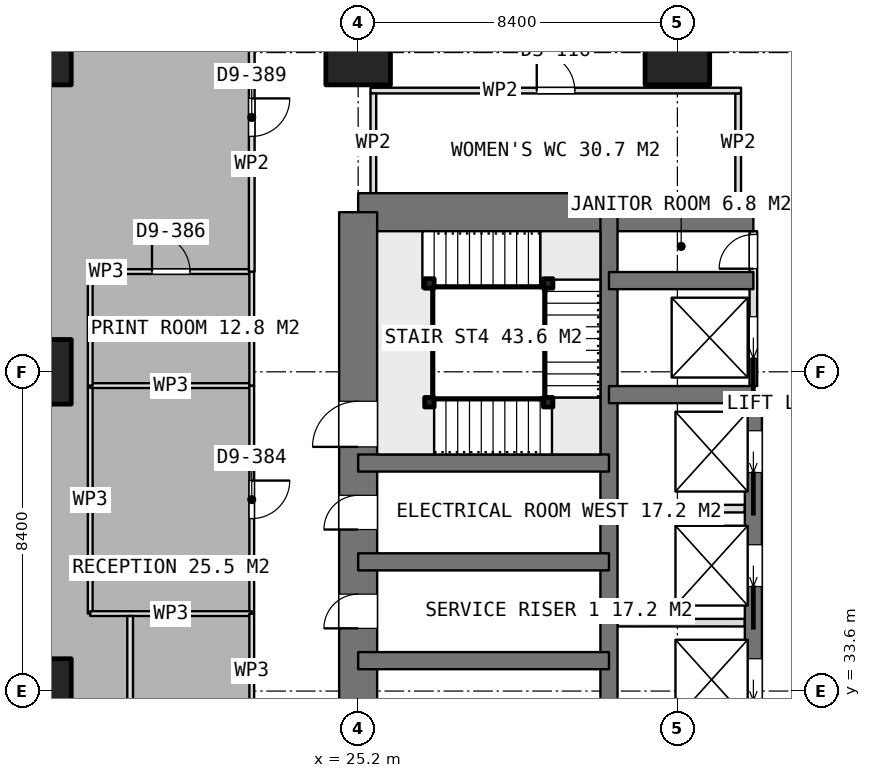
"""IFC4 building model, lengths in metres.
Left out: names, types, materials, properties, quantities, classifications, styles, units other than length and angle.
Written with IfcOpenShell. Run it as: python <this file> out.ifc"""

import sys

from ifc_helpers import new_model, si_unit, direction, frame, frame_2d, origin, origin_2d, place, context, subcontext, project, spatial, rectangle, extrude, element, fill, save


model = new_model("IFC4")
c1 = context("Model", 3, precision=1e-05, world=origin(), true_north=direction((0.0, 1.0)))
c2 = subcontext(c1, "Body", "Model", "MODEL_VIEW")
j1 = project(units=[si_unit("LENGTHUNIT", "METRE"), si_unit("PLANEANGLEUNIT", "RADIAN")], contexts=[c1])
p1 = place(None, origin())
s1 = spatial("IfcSite", under=j1, at=p1, CompositionType="ELEMENT")
p2 = place(p1, origin())
s2 = spatial("IfcBuilding", under=s1, at=p2, CompositionType="ELEMENT")
p3 = place(p2, frame((0.0, 0.0, 110.3)))
s3 = spatial("IfcBuildingStorey", under=s2, at=p3, CompositionType="ELEMENT", Elevation=110.3)
p4 = place(p3, frame((25.2, 46.2, 0.0), z_axis=(0.0, 0.0, 1.0), x_axis=(1.0, 0.0, 0.0)))
e1 = element("IfcWall", 1, at=p4, inside=s3, PredefinedType="SHEAR", context=c2, shape_type="SweptSolid", body=[
    extrude(rectangle(XDim=10.4, YDim=1.0, at=frame_2d((5.2, 0.0))), origin(), (0.0, 0.0, 1.0), 3.75),
])
p5 = place(p3, frame((25.2, 21.0, 0.0), z_axis=(0.0, 0.0, 1.0), x_axis=(0.0, 1.0, 0.0)))
e2 = element("IfcWall", 2, at=p5, inside=s3, PredefinedType="SHEAR", context=c2, shape_type="SweptSolid", body=[
    extrude(rectangle(XDim=25.2, YDim=1.0, at=frame_2d((12.6, 0.0))), origin(), (0.0, 0.0, 1.0), 3.75),
])
p6 = place(p5, frame((7.8, 0.0, 0.0)))
e3 = element("IfcOpeningElement", 3, at=p6, cuts=e2, PredefinedType="OPENING", context=c2, shape_type="SweptSolid", body=[
    extrude(rectangle(XDim=1.2, YDim=2.1, at=frame_2d((0.6, 1.05))), frame((0.0, 0.51, 0.0), z_axis=(0.0, -1.0, 0.0), x_axis=(1.0, 0.0, 0.0)), (0.0, 0.0, 1.0), 1.02),
])
p7 = place(p5, frame((14.25, 0.0, 0.0)))
e4 = element("IfcOpeningElement", 4, at=p7, cuts=e2, PredefinedType="OPENING", context=c2, shape_type="SweptSolid", body=[
    extrude(rectangle(XDim=0.9, YDim=2.1, at=frame_2d((0.45, 1.05))), frame((0.0, 0.51, 0.0), z_axis=(0.0, -1.0, 0.0), x_axis=(1.0, 0.0, 0.0)), (0.0, 0.0, 1.0), 1.02),
])
p8 = place(p5, frame((16.85, 0.0, 0.0)))
e5 = element("IfcOpeningElement", 5, at=p8, cuts=e2, PredefinedType="OPENING", context=c2, shape_type="SweptSolid", body=[
    extrude(rectangle(XDim=0.9, YDim=2.1, at=frame_2d((0.45, 1.05))), frame((0.0, 0.51, 0.0), z_axis=(0.0, -1.0, 0.0), x_axis=(1.0, 0.0, 0.0)), (0.0, 0.0, 1.0), 1.02),
])
p9 = place(p5, frame((19.025, 0.0, 0.0)))
e6 = element("IfcOpeningElement", 6, at=p9, cuts=e2, PredefinedType="OPENING", context=c2, shape_type="SweptSolid", body=[
    extrude(rectangle(XDim=1.2, YDim=2.1, at=frame_2d((0.6, 1.05))), frame((0.0, 0.51, 0.0), z_axis=(0.0, -1.0, 0.0), x_axis=(1.0, 0.0, 0.0)), (0.0, 0.0, 1.0), 1.02),
])
p10 = place(p3, frame((31.8, 21.0, 0.0), z_axis=(0.0, 0.0, 1.0), x_axis=(0.0, 1.0, 0.0)))
e7 = element("IfcWall", 7, at=p10, inside=s3, PredefinedType="SHEAR", context=c2, shape_type="SweptSolid", body=[
    extrude(rectangle(XDim=25.2, YDim=0.45, at=frame_2d((12.6, 0.0))), origin(), (0.0, 0.0, 1.0), 3.75),
])
p11 = place(p3, frame((35.6, 23.4, 0.0), z_axis=(0.0, 0.0, 1.0), x_axis=(0.0, 1.0, 0.0)))
e8 = element("IfcWall", 8, at=p11, inside=s3, PredefinedType="SHEAR", context=c2, shape_type="SweptSolid", body=[
    extrude(rectangle(XDim=18.0, YDim=0.45, at=frame_2d((9.0, 0.0))), origin(), (0.0, 0.0, 1.0), 3.75),
])
p12 = place(p11, frame((0.95, 0.0, 0.0)))
e9 = element("IfcOpeningElement", 9, at=p12, cuts=e8, PredefinedType="OPENING", context=c2, shape_type="SweptSolid", body=[
    extrude(rectangle(XDim=1.1, YDim=2.1, at=frame_2d((0.55, 1.05))), frame((0.0, 0.235, 0.0), z_axis=(0.0, -1.0, 0.0), x_axis=(1.0, 0.0, 0.0)), (0.0, 0.0, 1.0), 0.47),
])
p13 = place(p11, frame((3.95, 0.0, 0.0)))
e10 = element("IfcOpeningElement", 10, at=p13, cuts=e8, PredefinedType="OPENING", context=c2, shape_type="SweptSolid", body=[
    extrude(rectangle(XDim=1.1, YDim=2.1, at=frame_2d((0.55, 1.05))), frame((0.0, 0.235, 0.0), z_axis=(0.0, -1.0, 0.0), x_axis=(1.0, 0.0, 0.0)), (0.0, 0.0, 1.0), 0.47),
])
p14 = place(p11, frame((6.95, 0.0, 0.0)))
e11 = element("IfcOpeningElement", 11, at=p14, cuts=e8, PredefinedType="OPENING", context=c2, shape_type="SweptSolid", body=[
    extrude(rectangle(XDim=1.1, YDim=2.1, at=frame_2d((0.55, 1.05))), frame((0.0, 0.235, 0.0), z_axis=(0.0, -1.0, 0.0), x_axis=(1.0, 0.0, 0.0)), (0.0, 0.0, 1.0), 0.47),
])
p15 = place(p11, frame((9.95, 0.0, 0.0)))
e12 = element("IfcOpeningElement", 12, at=p15, cuts=e8, PredefinedType="OPENING", context=c2, shape_type="SweptSolid", body=[
    extrude(rectangle(XDim=1.1, YDim=2.1, at=frame_2d((0.55, 1.05))), frame((0.0, 0.235, 0.0), z_axis=(0.0, -1.0, 0.0), x_axis=(1.0, 0.0, 0.0)), (0.0, 0.0, 1.0), 0.47),
])
p16 = place(p11, frame((12.95, 0.0, 0.0)))
e13 = element("IfcOpeningElement", 13, at=p16, cuts=e8, PredefinedType="OPENING", context=c2, shape_type="SweptSolid", body=[
    extrude(rectangle(XDim=1.1, YDim=2.1, at=frame_2d((0.55, 1.05))), frame((0.0, 0.235, 0.0), z_axis=(0.0, -1.0, 0.0), x_axis=(1.0, 0.0, 0.0)), (0.0, 0.0, 1.0), 0.47),
])
p17 = place(p11, frame((15.95, 0.0, 0.0)))
e14 = element("IfcOpeningElement", 14, at=p17, cuts=e8, PredefinedType="OPENING", context=c2, shape_type="SweptSolid", body=[
    extrude(rectangle(XDim=1.1, YDim=2.1, at=frame_2d((0.55, 1.05))), frame((0.0, 0.235, 0.0), z_axis=(0.0, -1.0, 0.0), x_axis=(1.0, 0.0, 0.0)), (0.0, 0.0, 1.0), 0.47),
])
for number, where, z_axis, x_axis in (
    (15, (31.8, 41.4, 0.0), (0.0, 0.0, 1.0), (1.0, 0.0, 0.0)),
    (16, (31.8, 44.4, 0.0), (0.0, 0.0, 1.0), (1.0, 0.0, 0.0)),
):
    element("IfcWall", number, at=place(p3, frame(where, z_axis=z_axis, x_axis=x_axis)), inside=s3, PredefinedType="SHEAR", context=c2, shape_type="SweptSolid", body=[
        extrude(rectangle(XDim=3.8, YDim=0.45, at=frame_2d((1.9, 0.0))), origin(), (0.0, 0.0, 1.0), 3.75),
    ])
for number, where, z_axis, x_axis in (
    (17, (25.2, 34.4, 0.0), (0.0, 0.0, 1.0), (1.0, 0.0, 0.0)),
    (18, (25.2, 37.0, 0.0), (0.0, 0.0, 1.0), (1.0, 0.0, 0.0)),
    (19, (25.2, 39.6, 0.0), (0.0, 0.0, 1.0), (1.0, 0.0, 0.0)),
):
    element("IfcWall", number, at=place(p3, frame(where, z_axis=z_axis, x_axis=x_axis)), inside=s3, PredefinedType="SHEAR", context=c2, shape_type="SweptSolid", body=[
        extrude(rectangle(XDim=6.6, YDim=0.45, at=frame_2d((3.3, 0.0))), origin(), (0.0, 0.0, 1.0), 3.75),
    ])
for number, where, z_axis, x_axis in (
    (20, (16.8, 33.6, 0.0), (0.0, 0.0, 1.0), (1.0, 0.0, 0.0)),
    (21, (16.8, 42.0, 0.0), (0.0, 0.0, 1.0), (1.0, 0.0, 0.0)),
    (22, (16.8, 50.4, 0.0), (0.0, 0.0, 1.0), (1.0, 0.0, 0.0)),
    (23, (25.2, 50.4, 0.0), (0.0, 0.0, 1.0), (1.0, 0.0, 0.0)),
    (24, (33.6, 50.4, 0.0), (0.0, 0.0, 1.0), (1.0, 0.0, 0.0)),
):
    element("IfcColumn", number, at=place(p3, frame(where, z_axis=z_axis, x_axis=x_axis)), inside=s3, PredefinedType="COLUMN", context=c2, shape_type="SweptSolid", body=[
        extrude(rectangle(XDim=1.7, YDim=1.7, at=origin_2d()), origin(), (0.0, 0.0, 1.0), 3.75),
    ])
for number, where, z_axis, x_axis in (
    (25, (32.025, 35.4, 0.0), (0.0, 0.0, 1.0), (1.0, 0.0, 0.0)),
    (26, (32.025, 38.4, 0.0), (0.0, 0.0, 1.0), (1.0, 0.0, 0.0)),
):
    element("IfcWall", number, at=place(p3, frame(where, z_axis=z_axis, x_axis=x_axis)), inside=s3, PredefinedType="PARTITIONING", context=c2, shape_type="SweptSolid", body=[
        extrude(rectangle(XDim=3.35, YDim=0.2, at=frame_2d((1.675, 0.0))), origin(), (0.0, 0.0, 1.0), 3.5),
    ])
p18 = place(p3, frame((35.6, 41.625, 0.0), z_axis=(0.0, 0.0, 1.0), x_axis=(0.0, 1.0, 0.0)))
e27 = element("IfcWall", 27, at=p18, inside=s3, PredefinedType="PARTITIONING", context=c2, shape_type="SweptSolid", body=[
    extrude(rectangle(XDim=4.075, YDim=0.2, at=frame_2d((2.038, 0.0))), origin(), (0.0, 0.0, 1.0), 3.5),
])
p19 = place(p18, frame((3.088, 0.0, 0.0)))
e28 = element("IfcOpeningElement", 28, at=p19, cuts=e27, PredefinedType="OPENING", context=c2, shape_type="SweptSolid", body=[
    extrude(rectangle(XDim=0.9, YDim=2.1, at=frame_2d((0.45, 1.05))), frame((0.0, 0.11, 0.0), z_axis=(0.0, -1.0, 0.0), x_axis=(1.0, 0.0, 0.0)), (0.0, 0.0, 1.0), 0.22),
])
p20 = place(p18, frame((0.725, 0.0, 0.0)))
e29 = element("IfcOpeningElement", 29, at=p20, cuts=e27, PredefinedType="OPENING", context=c2, shape_type="SweptSolid", body=[
    extrude(rectangle(XDim=1.1, YDim=2.1, at=frame_2d((0.55, 1.05))), frame((0.0, 0.11, 0.0), z_axis=(0.0, -1.0, 0.0), x_axis=(1.0, 0.0, 0.0)), (0.0, 0.0, 1.0), 0.22),
])
p21 = place(p3, frame((25.525, 49.4, 0.0), z_axis=(0.0, 0.0, 1.0), x_axis=(1.0, 0.0, 0.0)))
e30 = element("IfcWall", 30, at=p21, inside=s3, PredefinedType="PARTITIONING", context=c2, shape_type="SweptSolid", body=[
    extrude(rectangle(XDim=9.75, YDim=0.15, at=frame_2d((4.875, 0.0))), origin(), (0.0, 0.0, 1.0), 3.5),
])
p22 = place(p21, frame((4.375, 0.0, 0.0)))
e31 = element("IfcOpeningElement", 31, at=p22, cuts=e30, PredefinedType="OPENING", context=c2, shape_type="SweptSolid", body=[
    extrude(rectangle(XDim=1.0, YDim=2.1, at=frame_2d((0.5, 1.05))), frame((0.0, 0.085, 0.0), z_axis=(0.0, -1.0, 0.0), x_axis=(1.0, 0.0, 0.0)), (0.0, 0.0, 1.0), 0.17),
])
for number, where, z_axis, x_axis in (
    (32, (25.6, 46.7, 0.0), (0.0, 0.0, 1.0), (0.0, 1.0, 0.0)),
    (33, (35.2, 46.7, 0.0), (0.0, 0.0, 1.0), (0.0, 1.0, 0.0)),
):
    element("IfcWall", number, at=place(p3, frame(where, z_axis=z_axis, x_axis=x_axis)), inside=s3, PredefinedType="PARTITIONING", context=c2, shape_type="SweptSolid", body=[
        extrude(rectangle(XDim=2.625, YDim=0.15, at=frame_2d((1.312, 0.0))), origin(), (0.0, 0.0, 1.0), 3.5),
    ])
p23 = place(p3, frame((18.15, 35.638, 0.0), z_axis=(0.0, 0.0, 1.0), x_axis=(0.0, 1.0, 0.0)))
e34 = element("IfcWall", 34, at=p23, inside=s3, PredefinedType="PARTITIONING", context=c2, shape_type="SweptSolid", body=[
    extrude(rectangle(XDim=5.999, YDim=0.125, at=frame_2d((3.0, 0.0))), origin(), (0.0, 0.0, 1.0), 3.5),
])
p24 = place(p3, frame((18.15, 41.637, 0.0), z_axis=(0.0, 0.0, 1.0), x_axis=(1.0, 0.0, 0.0)))
e35 = element("IfcWall", 35, at=p24, inside=s3, PredefinedType="PARTITIONING", context=c2, shape_type="SweptSolid", body=[
    extrude(rectangle(XDim=4.25, YDim=0.125, at=frame_2d((2.125, 0.0))), origin(), (0.0, 0.0, 1.0), 3.5),
])
p25 = place(p3, frame((22.4, 41.637, 0.0), z_axis=(0.0, 0.0, 1.0), x_axis=(0.0, -1.0, 0.0)))
e36 = element("IfcWall", 36, at=p25, inside=s3, PredefinedType="PARTITIONING", context=c2, shape_type="SweptSolid", body=[
    extrude(rectangle(XDim=5.999, YDim=0.125, at=frame_2d((3.0, 0.0))), origin(), (0.0, 0.0, 1.0), 3.5),
])
p26 = place(p25, frame((2.499, 0.0, 0.0)))
e37 = element("IfcOpeningElement", 37, at=p26, cuts=e36, PredefinedType="OPENING", context=c2, shape_type="SweptSolid", body=[
    extrude(rectangle(XDim=1.0, YDim=2.1, at=frame_2d((0.5, 1.05))), frame((0.0, 0.073, 0.0), z_axis=(0.0, -1.0, 0.0), x_axis=(1.0, 0.0, 0.0)), (0.0, 0.0, 1.0), 0.145),
])
p27 = place(p3, frame((22.4, 35.638, 0.0), z_axis=(0.0, 0.0, 1.0), x_axis=(-1.0, 0.0, 0.0)))
e38 = element("IfcWall", 38, at=p27, inside=s3, PredefinedType="PARTITIONING", context=c2, shape_type="SweptSolid", body=[
    extrude(rectangle(XDim=4.25, YDim=0.125, at=frame_2d((2.125, 0.0))), origin(), (0.0, 0.0, 1.0), 3.5),
])
p28 = place(p3, frame((18.15, 41.637, 0.0), z_axis=(0.0, 0.0, 1.0), x_axis=(0.0, 1.0, 0.0)))
e39 = element("IfcWall", 39, at=p28, inside=s3, PredefinedType="PARTITIONING", context=c2, shape_type="SweptSolid", body=[
    extrude(rectangle(XDim=3.0, YDim=0.125, at=frame_2d((1.5, 0.0))), origin(), (0.0, 0.0, 1.0), 3.5),
])
p29 = place(p3, frame((18.15, 44.637, 0.0), z_axis=(0.0, 0.0, 1.0), x_axis=(1.0, 0.0, 0.0)))
e40 = element("IfcWall", 40, at=p29, inside=s3, PredefinedType="PARTITIONING", context=c2, shape_type="SweptSolid", body=[
    extrude(rectangle(XDim=4.25, YDim=0.125, at=frame_2d((2.125, 0.0))), origin(), (0.0, 0.0, 1.0), 3.5),
])
p30 = place(p29, frame((1.625, 0.0, 0.0)))
e41 = element("IfcOpeningElement", 41, at=p30, cuts=e40, PredefinedType="OPENING", context=c2, shape_type="SweptSolid", body=[
    extrude(rectangle(XDim=1.0, YDim=2.1, at=frame_2d((0.5, 1.05))), frame((0.0, 0.073, 0.0), z_axis=(0.0, -1.0, 0.0), x_axis=(1.0, 0.0, 0.0)), (0.0, 0.0, 1.0), 0.145),
])
p31 = place(p3, frame((22.4, 44.637, 0.0), z_axis=(0.0, 0.0, 1.0), x_axis=(0.0, -1.0, 0.0)))
e42 = element("IfcWall", 42, at=p31, inside=s3, PredefinedType="PARTITIONING", context=c2, shape_type="SweptSolid", body=[
    extrude(rectangle(XDim=3.0, YDim=0.125, at=frame_2d((1.5, 0.0))), origin(), (0.0, 0.0, 1.0), 3.5),
])
p32 = place(p3, frame((22.4, 52.75, 0.0), z_axis=(0.0, 0.0, 1.0), x_axis=(0.0, -1.0, 0.0)))
e43 = element("IfcWall", 43, at=p32, inside=s3, PredefinedType="PARTITIONING", context=c2, shape_type="SweptSolid", body=[
    extrude(rectangle(XDim=8.113, YDim=0.15, at=frame_2d((4.057, 0.0))), origin(), (0.0, 0.0, 1.0), 3.5),
])
p33 = place(p32, frame((3.556, 0.0, 0.0)))
e44 = element("IfcOpeningElement", 44, at=p33, cuts=e43, PredefinedType="OPENING", context=c2, shape_type="SweptSolid", body=[
    extrude(rectangle(XDim=1.0, YDim=2.1, at=frame_2d((0.5, 1.05))), frame((0.0, 0.085, 0.0), z_axis=(0.0, -1.0, 0.0), x_axis=(1.0, 0.0, 0.0)), (0.0, 0.0, 1.0), 0.17),
])
p34 = place(p3, frame((19.2, 35.575, 0.0), z_axis=(0.0, 0.0, 1.0), x_axis=(0.0, -1.0, 0.0)))
e45 = element("IfcWall", 45, at=p34, inside=s3, PredefinedType="PARTITIONING", context=c2, shape_type="SweptSolid", body=[
    extrude(rectangle(XDim=7.65, YDim=0.15, at=frame_2d((3.825, 0.0))), origin(), (0.0, 0.0, 1.0), 3.5),
])
p35 = place(p3, frame((22.4, 35.637, 0.0), z_axis=(0.0, 0.0, 1.0), x_axis=(0.0, -1.0, 0.0)))
e46 = element("IfcWall", 46, at=p35, inside=s3, PredefinedType="PARTITIONING", context=c2, shape_type="SweptSolid", body=[
    extrude(rectangle(XDim=7.562, YDim=0.125, at=frame_2d((3.781, 0.0))), origin(), (0.0, 0.0, 1.0), 3.5),
])
p36 = place(p35, frame((3.319, 0.0, 0.0)))
e47 = element("IfcOpeningElement", 47, at=p36, cuts=e46, PredefinedType="OPENING", context=c2, shape_type="SweptSolid", body=[
    extrude(rectangle(XDim=1.0, YDim=2.1, at=frame_2d((0.5, 1.05))), frame((0.0, 0.073, 0.0), z_axis=(0.0, -1.0, 0.0), x_axis=(1.0, 0.0, 0.0)), (0.0, 0.0, 1.0), 0.145),
])
for number, where, z_axis, x_axis in (
    (48, (27.075, 41.2, 0.0), (0.0, 0.0, 1.0), (1.0, 0.0, 0.0)),
    (49, (30.2, 41.2, 0.0), (0.0, 0.0, 1.0), (1.0, 0.0, 0.0)),
    (50, (30.2, 44.325, 0.0), (0.0, 0.0, 1.0), (1.0, 0.0, 0.0)),
    (51, (27.075, 44.325, 0.0), (0.0, 0.0, 1.0), (1.0, 0.0, 0.0)),
):
    element("IfcColumn", number, at=place(p3, frame(where, z_axis=z_axis, x_axis=x_axis)), inside=s3, PredefinedType="COLUMN", context=c2, shape_type="SweptSolid", body=[
        extrude(rectangle(XDim=0.25, YDim=0.25, at=origin_2d()), origin(), (0.0, 0.0, 1.0), 3.75),
    ])
p37 = place(p7, origin())
e52 = element("IfcDoor", 52, at=p37, inside=s3, OperationType="SINGLE_SWING_LEFT", PredefinedType="DOOR", context=c2, shape_type="SweptSolid", body=[
    extrude(rectangle(XDim=0.9, YDim=2.1, at=frame_2d((0.45, 1.05))), frame((0.0, 0.025, 0.0), z_axis=(0.0, -1.0, 0.0), x_axis=(1.0, 0.0, 0.0)), (0.0, 0.0, 1.0), 0.05),
])
fill(e4, e52)
p38 = place(p8, origin())
e53 = element("IfcDoor", 53, at=p38, inside=s3, OperationType="SINGLE_SWING_LEFT", PredefinedType="DOOR", context=c2, shape_type="SweptSolid", body=[
    extrude(rectangle(XDim=0.9, YDim=2.1, at=frame_2d((0.45, 1.05))), frame((0.0, 0.025, 0.0), z_axis=(0.0, -1.0, 0.0), x_axis=(1.0, 0.0, 0.0)), (0.0, 0.0, 1.0), 0.05),
])
fill(e5, e53)
p39 = place(p19, origin())
e54 = element("IfcDoor", 54, at=p39, inside=s3, OperationType="SINGLE_SWING_LEFT", PredefinedType="DOOR", context=c2, shape_type="SweptSolid", body=[
    extrude(rectangle(XDim=0.9, YDim=2.1, at=frame_2d((0.45, 1.05))), frame((0.0, 0.025, 0.0), z_axis=(0.0, -1.0, 0.0), x_axis=(1.0, 0.0, 0.0)), (0.0, 0.0, 1.0), 0.05),
])
fill(e28, e54)
p40 = place(p15, origin())
e55 = element("IfcDoor", 55, at=p40, inside=s3, OperationType="SLIDING_TO_LEFT", PredefinedType="USERDEFINED", context=c2, shape_type="SweptSolid", body=[
    extrude(rectangle(XDim=1.1, YDim=2.1, at=frame_2d((0.55, 1.05))), frame((0.0, 0.025, 0.0), z_axis=(0.0, -1.0, 0.0), x_axis=(1.0, 0.0, 0.0)), (0.0, 0.0, 1.0), 0.05),
])
fill(e12, e55)
p41 = place(p16, origin())
e56 = element("IfcDoor", 56, at=p41, inside=s3, OperationType="SLIDING_TO_LEFT", PredefinedType="USERDEFINED", context=c2, shape_type="SweptSolid", body=[
    extrude(rectangle(XDim=1.1, YDim=2.1, at=frame_2d((0.55, 1.05))), frame((0.0, 0.025, 0.0), z_axis=(0.0, -1.0, 0.0), x_axis=(1.0, 0.0, 0.0)), (0.0, 0.0, 1.0), 0.05),
])
fill(e13, e56)
p42 = place(p17, origin())
e57 = element("IfcDoor", 57, at=p42, inside=s3, OperationType="SLIDING_TO_LEFT", PredefinedType="USERDEFINED", context=c2, shape_type="SweptSolid", body=[
    extrude(rectangle(XDim=1.1, YDim=2.1, at=frame_2d((0.55, 1.05))), frame((0.0, 0.025, 0.0), z_axis=(0.0, -1.0, 0.0), x_axis=(1.0, 0.0, 0.0)), (0.0, 0.0, 1.0), 0.05),
])
fill(e14, e57)
p43 = place(p20, origin())
e58 = element("IfcDoor", 58, at=p43, inside=s3, OperationType="SLIDING_TO_LEFT", PredefinedType="USERDEFINED", context=c2, shape_type="SweptSolid", body=[
    extrude(rectangle(XDim=1.1, YDim=2.1, at=frame_2d((0.55, 1.05))), frame((0.0, 0.025, 0.0), z_axis=(0.0, -1.0, 0.0), x_axis=(1.0, 0.0, 0.0)), (0.0, 0.0, 1.0), 0.05),
])
fill(e29, e58)
p44 = place(p22, origin())
e59 = element("IfcDoor", 59, at=p44, inside=s3, OperationType="SINGLE_SWING_LEFT", PredefinedType="DOOR", context=c2, shape_type="SweptSolid", body=[
    extrude(rectangle(XDim=1.0, YDim=2.1, at=frame_2d((0.5, 1.05))), frame((0.0, 0.025, 0.0), z_axis=(0.0, -1.0, 0.0), x_axis=(1.0, 0.0, 0.0)), (0.0, 0.0, 1.0), 0.05),
])
fill(e31, e59)
p45 = place(p26, origin())
e60 = element("IfcDoor", 60, at=p45, inside=s3, OperationType="SINGLE_SWING_LEFT", PredefinedType="DOOR", context=c2, shape_type="SweptSolid", body=[
    extrude(rectangle(XDim=1.0, YDim=2.1, at=frame_2d((0.5, 1.05))), frame((0.0, 0.025, 0.0), z_axis=(0.0, -1.0, 0.0), x_axis=(1.0, 0.0, 0.0)), (0.0, 0.0, 1.0), 0.05),
])
fill(e37, e60)
p46 = place(p30, origin())
e61 = element("IfcDoor", 61, at=p46, inside=s3, OperationType="SINGLE_SWING_LEFT", PredefinedType="DOOR", context=c2, shape_type="SweptSolid", body=[
    extrude(rectangle(XDim=1.0, YDim=2.1, at=frame_2d((0.5, 1.05))), frame((0.0, 0.025, 0.0), z_axis=(0.0, -1.0, 0.0), x_axis=(1.0, 0.0, 0.0)), (0.0, 0.0, 1.0), 0.05),
])
fill(e41, e61)
p47 = place(p33, origin())
e62 = element("IfcDoor", 62, at=p47, inside=s3, OperationType="SINGLE_SWING_LEFT", PredefinedType="DOOR", context=c2, shape_type="SweptSolid", body=[
    extrude(rectangle(XDim=1.0, YDim=2.1, at=frame_2d((0.5, 1.05))), frame((0.0, 0.025, 0.0), z_axis=(0.0, -1.0, 0.0), x_axis=(1.0, 0.0, 0.0)), (0.0, 0.0, 1.0), 0.05),
])
fill(e44, e62)
p48 = place(p9, origin())
e63 = element("IfcDoor", 63, at=p48, inside=s3, OperationType="SINGLE_SWING_RIGHT", PredefinedType="DOOR", context=c2, shape_type="SweptSolid", body=[
    extrude(rectangle(XDim=1.2, YDim=2.1, at=frame_2d((0.6, 1.05))), frame((0.0, 0.025, 0.0), z_axis=(0.0, -1.0, 0.0), x_axis=(1.0, 0.0, 0.0)), (0.0, 0.0, 1.0), 0.05),
])
fill(e6, e63)
save(model, sys.argv[1])
